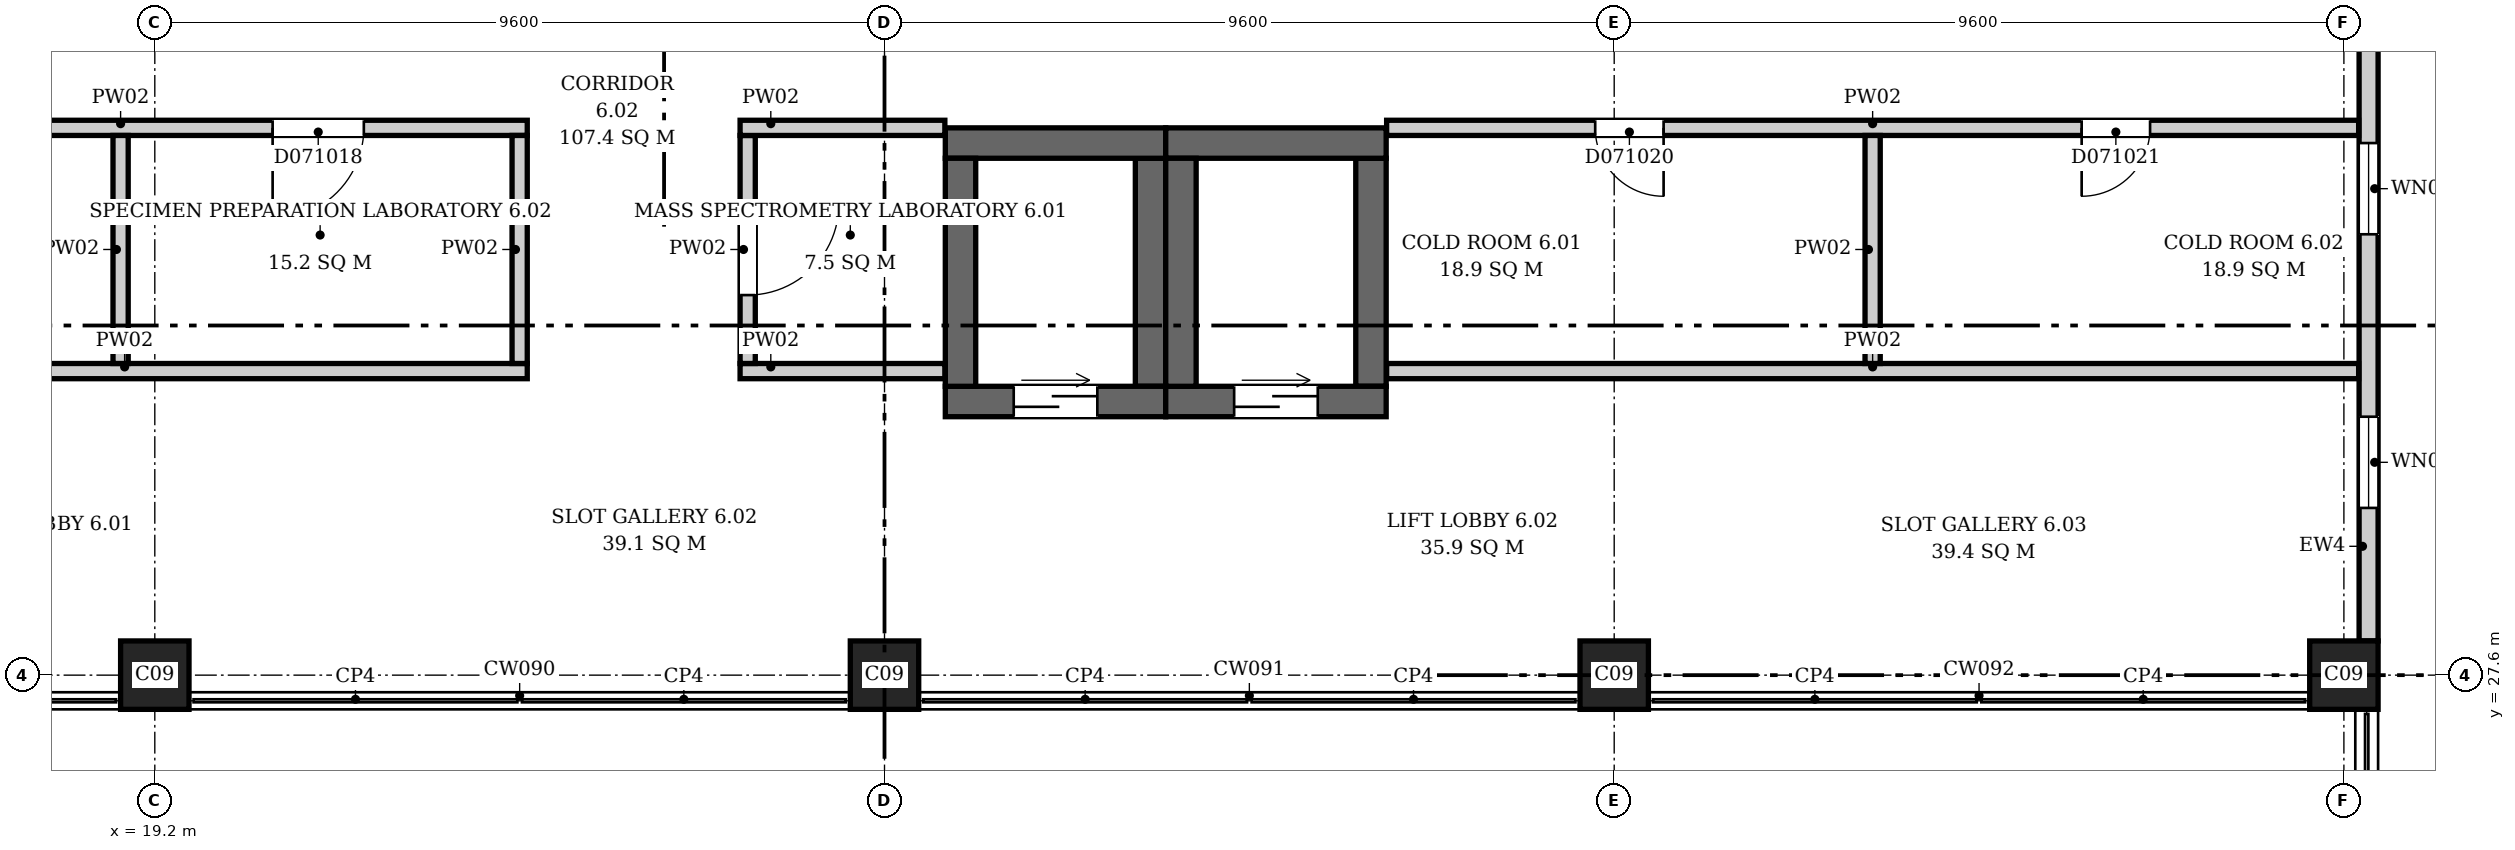
"""IFC4 building model, lengths in metres.
Left out: names, types, materials, properties, quantities, classifications, styles, units other than length and angle.
Written with IfcOpenShell. Run it as: python <this file> out.ifc"""

import sys

from ifc_helpers import new_model, si_unit, direction, frame, frame_2d, origin, origin_2d, place, context, subcontext, project, spatial, rectangle, extrude, element, fill, save


model = new_model("IFC4")
c1 = context("Model", 3, precision=1e-05, world=origin(), true_north=direction((0.0, 1.0)))
c2 = subcontext(c1, "Body", "Model", "MODEL_VIEW")
j1 = project(units=[si_unit("LENGTHUNIT", "METRE"), si_unit("PLANEANGLEUNIT", "RADIAN")], contexts=[c1])
p1 = place(None, origin())
s1 = spatial("IfcSite", under=j1, at=p1, CompositionType="ELEMENT")
p2 = place(p1, origin())
s2 = spatial("IfcBuilding", under=s1, at=p2, CompositionType="ELEMENT")
p3 = place(p2, frame((0.0, 0.0, 36.1)))
s3 = spatial("IfcBuildingStorey", under=s2, at=p3, CompositionType="ELEMENT", Elevation=36.1)
p4 = place(p3, frame((29.6, 31.2, 0.0), z_axis=(0.0, 0.0, 1.0), x_axis=(1.0, 0.0, 0.0)))
e1 = element("IfcWall", 1, at=p4, inside=s3, PredefinedType="SHEAR", context=c2, shape_type="SweptSolid", body=[
    extrude(rectangle(XDim=2.9, YDim=0.4, at=frame_2d((1.45, 0.0))), origin(), (0.0, 0.0, 1.0), 4.2),
])
p5 = place(p4, frame((0.9, 0.0, 0.0)))
e2 = element("IfcOpeningElement", 2, at=p5, cuts=e1, PredefinedType="OPENING", context=c2, shape_type="SweptSolid", body=[
    extrude(rectangle(XDim=1.1, YDim=2.1, at=frame_2d((0.55, 1.05))), frame((0.0, 0.21, 0.0), z_axis=(0.0, -1.0, 0.0), x_axis=(1.0, 0.0, 0.0)), (0.0, 0.0, 1.0), 0.42),
])
p6 = place(p3, frame((29.6, 34.6, 0.0), z_axis=(0.0, 0.0, 1.0), x_axis=(1.0, 0.0, 0.0)))
e3 = element("IfcWall", 3, at=p6, inside=s3, PredefinedType="SHEAR", context=c2, shape_type="SweptSolid", body=[
    extrude(rectangle(XDim=2.9, YDim=0.4, at=frame_2d((1.45, 0.0))), origin(), (0.0, 0.0, 1.0), 4.2),
])
for number, where, z_axis, x_axis in (
    (4, (29.8, 31.4, 0.0), (0.0, 0.0, 1.0), (0.0, 1.0, 0.0)),
    (5, (32.3, 31.4, 0.0), (0.0, 0.0, 1.0), (0.0, 1.0, 0.0)),
):
    element("IfcWall", number, at=place(p3, frame(where, z_axis=z_axis, x_axis=x_axis)), inside=s3, PredefinedType="SHEAR", context=c2, shape_type="SweptSolid", body=[
        extrude(rectangle(XDim=3.0, YDim=0.4, at=frame_2d((1.5, 0.0))), origin(), (0.0, 0.0, 1.0), 4.2),
    ])
p7 = place(p3, frame((32.5, 31.2, 0.0), z_axis=(0.0, 0.0, 1.0), x_axis=(1.0, 0.0, 0.0)))
e6 = element("IfcWall", 6, at=p7, inside=s3, PredefinedType="SHEAR", context=c2, shape_type="SweptSolid", body=[
    extrude(rectangle(XDim=2.9, YDim=0.4, at=frame_2d((1.45, 0.0))), origin(), (0.0, 0.0, 1.0), 4.2),
])
p8 = place(p7, frame((0.9, 0.0, 0.0)))
e7 = element("IfcOpeningElement", 7, at=p8, cuts=e6, PredefinedType="OPENING", context=c2, shape_type="SweptSolid", body=[
    extrude(rectangle(XDim=1.1, YDim=2.1, at=frame_2d((0.55, 1.05))), frame((0.0, 0.21, 0.0), z_axis=(0.0, -1.0, 0.0), x_axis=(1.0, 0.0, 0.0)), (0.0, 0.0, 1.0), 0.42),
])
p9 = place(p3, frame((32.5, 34.6, 0.0), z_axis=(0.0, 0.0, 1.0), x_axis=(1.0, 0.0, 0.0)))
e8 = element("IfcWall", 8, at=p9, inside=s3, PredefinedType="SHEAR", context=c2, shape_type="SweptSolid", body=[
    extrude(rectangle(XDim=2.9, YDim=0.4, at=frame_2d((1.45, 0.0))), origin(), (0.0, 0.0, 1.0), 4.2),
])
for number, where, z_axis, x_axis in (
    (9, (32.7, 31.4, 0.0), (0.0, 0.0, 1.0), (0.0, 1.0, 0.0)),
    (10, (35.2, 31.4, 0.0), (0.0, 0.0, 1.0), (0.0, 1.0, 0.0)),
):
    element("IfcWall", number, at=place(p3, frame(where, z_axis=z_axis, x_axis=x_axis)), inside=s3, PredefinedType="SHEAR", context=c2, shape_type="SweptSolid", body=[
        extrude(rectangle(XDim=3.0, YDim=0.4, at=frame_2d((1.5, 0.0))), origin(), (0.0, 0.0, 1.0), 4.2),
    ])
for number, where, z_axis, x_axis in (
    (11, (19.2, 27.6, 0.0), (0.0, 0.0, 1.0), (1.0, 0.0, 0.0)),
    (12, (28.8, 27.6, 0.0), (0.0, 0.0, 1.0), (1.0, 0.0, 0.0)),
    (13, (38.4, 27.6, 0.0), (0.0, 0.0, 1.0), (1.0, 0.0, 0.0)),
    (14, (48.0, 27.6, 0.0), (0.0, 0.0, 1.0), (1.0, 0.0, 0.0)),
):
    element("IfcColumn", number, at=place(p3, frame(where, z_axis=z_axis, x_axis=x_axis)), inside=s3, PredefinedType="COLUMN", context=c2, shape_type="SweptSolid", body=[
        extrude(rectangle(XDim=0.9, YDim=0.9, at=origin_2d()), origin(), (0.0, 0.0, 1.0), 4.2),
    ])
p10 = place(p3, frame((48.325, 28.05, 0.0), z_axis=(0.0, 0.0, 1.0), x_axis=(0.0, 1.0, 0.0)))
e15 = element("IfcWall", 15, at=p10, inside=s3, PredefinedType="ELEMENTEDWALL", context=c2, shape_type="SweptSolid", body=[
    extrude(rectangle(XDim=8.3, YDim=0.25, at=frame_2d((4.15, 0.0))), origin(), (0.0, 0.0, 1.0), 3.9),
])
p11 = place(p10, frame((1.75, 0.0, 0.9)))
e16 = element("IfcOpeningElement", 16, at=p11, cuts=e15, PredefinedType="OPENING", context=c2, shape_type="SweptSolid", body=[
    extrude(rectangle(XDim=1.2, YDim=2.6, at=frame_2d((0.6, 1.3))), frame((0.0, 0.135, 0.0), z_axis=(0.0, -1.0, 0.0), x_axis=(1.0, 0.0, 0.0)), (0.0, 0.0, 1.0), 0.27),
])
p12 = place(p10, frame((5.35, 0.0, 0.9)))
e17 = element("IfcOpeningElement", 17, at=p12, cuts=e15, PredefinedType="OPENING", context=c2, shape_type="SweptSolid", body=[
    extrude(rectangle(XDim=1.2, YDim=2.6, at=frame_2d((0.6, 1.3))), frame((0.0, 0.135, 0.0), z_axis=(0.0, -1.0, 0.0), x_axis=(1.0, 0.0, 0.0)), (0.0, 0.0, 1.0), 0.27),
])
p13 = place(p3, frame((13.4, 34.8, 0.0), z_axis=(0.0, 0.0, 1.0), x_axis=(1.0, 0.0, 0.0)))
e18 = element("IfcWall", 18, at=p13, inside=s3, PredefinedType="PARTITIONING", context=c2, shape_type="SweptSolid", body=[
    extrude(rectangle(XDim=10.7, YDim=0.2, at=frame_2d((5.35, 0.0))), origin(), (0.0, 0.0, 1.0), 3.9),
])
p14 = place(p13, frame((2.1, 0.0, 0.0)))
e19 = element("IfcOpeningElement", 19, at=p14, cuts=e18, PredefinedType="OPENING", context=c2, shape_type="SweptSolid", body=[
    extrude(rectangle(XDim=1.2, YDim=2.1, at=frame_2d((0.6, 1.05))), frame((0.0, 0.11, 0.0), z_axis=(0.0, -1.0, 0.0), x_axis=(1.0, 0.0, 0.0)), (0.0, 0.0, 1.0), 0.22),
])
p15 = place(p13, frame((7.35, 0.0, 0.0)))
e20 = element("IfcOpeningElement", 20, at=p15, cuts=e18, PredefinedType="OPENING", context=c2, shape_type="SweptSolid", body=[
    extrude(rectangle(XDim=1.2, YDim=2.1, at=frame_2d((0.6, 1.05))), frame((0.0, 0.11, 0.0), z_axis=(0.0, -1.0, 0.0), x_axis=(1.0, 0.0, 0.0)), (0.0, 0.0, 1.0), 0.22),
])
p16 = place(p3, frame((13.506, 31.6, 0.0), z_axis=(0.0, 0.0, 1.0), x_axis=(1.0, 0.0, 0.0)))
e21 = element("IfcWall", 21, at=p16, inside=s3, PredefinedType="PARTITIONING", context=c2, shape_type="SweptSolid", body=[
    extrude(rectangle(XDim=10.594, YDim=0.2, at=frame_2d((5.297, 0.0))), origin(), (0.0, 0.0, 1.0), 3.9),
])
for number, where, z_axis, x_axis in (
    (22, (18.75, 31.7, 0.0), (0.0, 0.0, 1.0), (0.0, 1.0, 0.0)),
    (23, (24.0, 31.7, 0.0), (0.0, 0.0, 1.0), (0.0, 1.0, 0.0)),
):
    element("IfcWall", number, at=place(p3, frame(where, z_axis=z_axis, x_axis=x_axis)), inside=s3, PredefinedType="PARTITIONING", context=c2, shape_type="SweptSolid", body=[
        extrude(rectangle(XDim=3.0, YDim=0.2, at=frame_2d((1.5, 0.0))), origin(), (0.0, 0.0, 1.0), 3.9),
    ])
p17 = place(p3, frame((26.9, 31.6, 0.0), z_axis=(0.0, 0.0, 1.0), x_axis=(1.0, 0.0, 0.0)))
e24 = element("IfcWall", 24, at=p17, inside=s3, PredefinedType="PARTITIONING", context=c2, shape_type="SweptSolid", body=[
    extrude(rectangle(XDim=2.694, YDim=0.2, at=frame_2d((1.347, 0.0))), origin(), (0.0, 0.0, 1.0), 3.9),
])
p18 = place(p3, frame((27.0, 31.7, 0.0), z_axis=(0.0, 0.0, 1.0), x_axis=(0.0, 1.0, 0.0)))
e25 = element("IfcWall", 25, at=p18, inside=s3, PredefinedType="PARTITIONING", context=c2, shape_type="SweptSolid", body=[
    extrude(rectangle(XDim=3.0, YDim=0.2, at=frame_2d((1.5, 0.0))), origin(), (0.0, 0.0, 1.0), 3.9),
])
p19 = place(p18, frame((0.9, 0.0, 0.0)))
e26 = element("IfcOpeningElement", 26, at=p19, cuts=e25, PredefinedType="OPENING", context=c2, shape_type="SweptSolid", body=[
    extrude(rectangle(XDim=1.2, YDim=2.1, at=frame_2d((0.6, 1.05))), frame((0.0, 0.11, 0.0), z_axis=(0.0, -1.0, 0.0), x_axis=(1.0, 0.0, 0.0)), (0.0, 0.0, 1.0), 0.22),
])
p20 = place(p3, frame((26.9, 34.8, 0.0), z_axis=(0.0, 0.0, 1.0), x_axis=(1.0, 0.0, 0.0)))
e27 = element("IfcWall", 27, at=p20, inside=s3, PredefinedType="PARTITIONING", context=c2, shape_type="SweptSolid", body=[
    extrude(rectangle(XDim=2.694, YDim=0.2, at=frame_2d((1.347, 0.0))), origin(), (0.0, 0.0, 1.0), 3.9),
])
p21 = place(p3, frame((35.406, 31.6, 0.0), z_axis=(0.0, 0.0, 1.0), x_axis=(1.0, 0.0, 0.0)))
e28 = element("IfcWall", 28, at=p21, inside=s3, PredefinedType="PARTITIONING", context=c2, shape_type="SweptSolid", body=[
    extrude(rectangle(XDim=12.788, YDim=0.2, at=frame_2d((6.394, 0.0))), origin(), (0.0, 0.0, 1.0), 3.9),
])
p22 = place(p3, frame((35.406, 34.8, 0.0), z_axis=(0.0, 0.0, 1.0), x_axis=(1.0, 0.0, 0.0)))
e29 = element("IfcWall", 29, at=p22, inside=s3, PredefinedType="PARTITIONING", context=c2, shape_type="SweptSolid", body=[
    extrude(rectangle(XDim=12.788, YDim=0.2, at=frame_2d((6.394, 0.0))), origin(), (0.0, 0.0, 1.0), 3.9),
])
p23 = place(p22, frame((2.744, 0.0, 0.0)))
e30 = element("IfcOpeningElement", 30, at=p23, cuts=e29, PredefinedType="OPENING", context=c2, shape_type="SweptSolid", body=[
    extrude(rectangle(XDim=0.9, YDim=2.1, at=frame_2d((0.45, 1.05))), frame((0.0, 0.11, 0.0), z_axis=(0.0, -1.0, 0.0), x_axis=(1.0, 0.0, 0.0)), (0.0, 0.0, 1.0), 0.22),
])
p24 = place(p22, frame((9.144, 0.0, 0.0)))
e31 = element("IfcOpeningElement", 31, at=p24, cuts=e29, PredefinedType="OPENING", context=c2, shape_type="SweptSolid", body=[
    extrude(rectangle(XDim=0.9, YDim=2.1, at=frame_2d((0.45, 1.05))), frame((0.0, 0.11, 0.0), z_axis=(0.0, -1.0, 0.0), x_axis=(1.0, 0.0, 0.0)), (0.0, 0.0, 1.0), 0.22),
])
p25 = place(p3, frame((41.8, 31.7, 0.0), z_axis=(0.0, 0.0, 1.0), x_axis=(0.0, 1.0, 0.0)))
e32 = element("IfcWall", 32, at=p25, inside=s3, PredefinedType="PARTITIONING", context=c2, shape_type="SweptSolid", body=[
    extrude(rectangle(XDim=3.0, YDim=0.2, at=frame_2d((1.5, 0.0))), origin(), (0.0, 0.0, 1.0), 3.9),
])
p26 = place(p11, origin())
e33 = element("IfcWindow", 33, at=p26, inside=s3, PartitioningType="SINGLE_PANEL", PredefinedType="WINDOW", context=c2, shape_type="SweptSolid", body=[
    extrude(rectangle(XDim=1.2, YDim=2.6, at=frame_2d((0.6, 1.3))), frame((0.0, 0.03, 0.0), z_axis=(0.0, -1.0, 0.0), x_axis=(1.0, 0.0, 0.0)), (0.0, 0.0, 1.0), 0.06),
])
fill(e16, e33)
p27 = place(p12, origin())
e34 = element("IfcWindow", 34, at=p27, inside=s3, PartitioningType="SINGLE_PANEL", PredefinedType="WINDOW", context=c2, shape_type="SweptSolid", body=[
    extrude(rectangle(XDim=1.2, YDim=2.6, at=frame_2d((0.6, 1.3))), frame((0.0, 0.03, 0.0), z_axis=(0.0, -1.0, 0.0), x_axis=(1.0, 0.0, 0.0)), (0.0, 0.0, 1.0), 0.06),
])
fill(e17, e34)
p28 = place(p5, origin())
e35 = element("IfcDoor", 35, at=p28, inside=s3, OperationType="DOUBLE_DOOR_SLIDING", PredefinedType="DOOR", context=c2, shape_type="SweptSolid", body=[
    extrude(rectangle(XDim=1.1, YDim=2.1, at=frame_2d((0.55, 1.05))), frame((0.0, 0.025, 0.0), z_axis=(0.0, -1.0, 0.0), x_axis=(1.0, 0.0, 0.0)), (0.0, 0.0, 1.0), 0.05),
])
fill(e2, e35)
p29 = place(p8, origin())
e36 = element("IfcDoor", 36, at=p29, inside=s3, OperationType="DOUBLE_DOOR_SLIDING", PredefinedType="DOOR", context=c2, shape_type="SweptSolid", body=[
    extrude(rectangle(XDim=1.1, YDim=2.1, at=frame_2d((0.55, 1.05))), frame((0.0, 0.025, 0.0), z_axis=(0.0, -1.0, 0.0), x_axis=(1.0, 0.0, 0.0)), (0.0, 0.0, 1.0), 0.05),
])
fill(e7, e36)
p30 = place(p15, origin())
e37 = element("IfcDoor", 37, at=p30, inside=s3, OperationType="SINGLE_SWING_LEFT", PredefinedType="DOOR", context=c2, shape_type="SweptSolid", body=[
    extrude(rectangle(XDim=1.2, YDim=2.1, at=frame_2d((0.6, 1.05))), frame((0.0, 0.025, 0.0), z_axis=(0.0, -1.0, 0.0), x_axis=(1.0, 0.0, 0.0)), (0.0, 0.0, 1.0), 0.05),
])
fill(e20, e37)
p31 = place(p19, origin())
e38 = element("IfcDoor", 38, at=p31, inside=s3, OperationType="SINGLE_SWING_RIGHT", PredefinedType="DOOR", context=c2, shape_type="SweptSolid", body=[
    extrude(rectangle(XDim=1.2, YDim=2.1, at=frame_2d((0.6, 1.05))), frame((0.0, 0.025, 0.0), z_axis=(0.0, -1.0, 0.0), x_axis=(1.0, 0.0, 0.0)), (0.0, 0.0, 1.0), 0.05),
])
fill(e26, e38)
p32 = place(p23, origin())
e39 = element("IfcDoor", 39, at=p32, inside=s3, OperationType="SINGLE_SWING_RIGHT", PredefinedType="DOOR", context=c2, shape_type="SweptSolid", body=[
    extrude(rectangle(XDim=0.9, YDim=2.1, at=frame_2d((0.45, 1.05))), frame((0.0, 0.025, 0.0), z_axis=(0.0, -1.0, 0.0), x_axis=(1.0, 0.0, 0.0)), (0.0, 0.0, 1.0), 0.05),
])
fill(e30, e39)
p33 = place(p24, origin())
e40 = element("IfcDoor", 40, at=p33, inside=s3, OperationType="SINGLE_SWING_LEFT", PredefinedType="DOOR", context=c2, shape_type="SweptSolid", body=[
    extrude(rectangle(XDim=0.9, YDim=2.1, at=frame_2d((0.45, 1.05))), frame((0.0, 0.025, 0.0), z_axis=(0.0, -1.0, 0.0), x_axis=(1.0, 0.0, 0.0)), (0.0, 0.0, 1.0), 0.05),
])
fill(e31, e40)
save(model, sys.argv[1])
